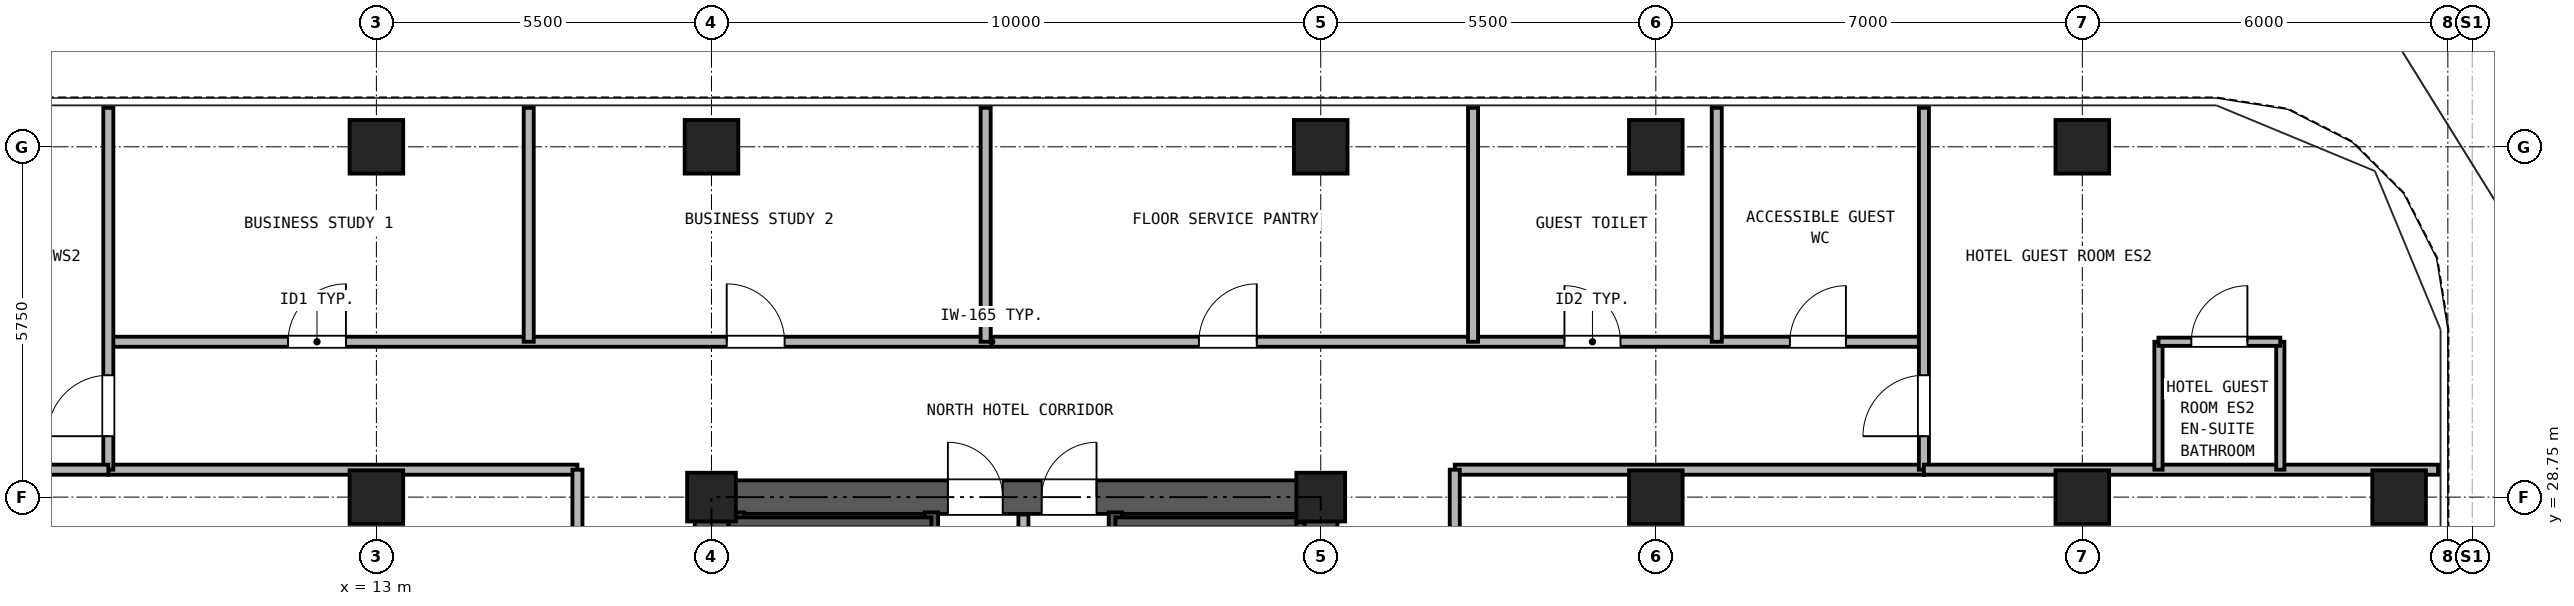
"""IFC4 building model, lengths in metres.
Left out: names, types, materials, properties, quantities, classifications, styles, units other than length and angle.
Written with IfcOpenShell. Run it as: python <this file> out.ifc"""

import sys

from ifc_helpers import new_model, si_unit, direction, frame, frame_2d, origin, origin_2d, place, context, subcontext, project, spatial, rectangle, hollow_rectangle, extrude, source, transform, mapped, element, fill, save


model = new_model("IFC4")
c1 = context("Model", 3, precision=1e-05, world=origin(), true_north=direction((0.0, 1.0)))
c2 = subcontext(c1, "Body", "Model", "MODEL_VIEW")
j1 = project(units=[si_unit("LENGTHUNIT", "METRE"), si_unit("PLANEANGLEUNIT", "RADIAN")], contexts=[c1])
p1 = place(None, origin())
s1 = spatial("IfcSite", under=j1, at=p1, CompositionType="ELEMENT")
p2 = place(p1, origin())
s2 = spatial("IfcBuilding", under=s1, at=p2, CompositionType="ELEMENT")
p3 = place(p2, frame((0.0, 0.0, 111.9)))
s3 = spatial("IfcBuildingStorey", under=s2, at=p3, CompositionType="ELEMENT", Elevation=111.9)
m1 = source(origin(), c2, "Body", "SweptSolid", [
    extrude(hollow_rectangle(XDim=0.88, YDim=0.88, WallThickness=0.05, at=origin_2d()), origin(), (0.0, 0.0, 1.0), 2.95),
])
for number, where, z_axis, x_axis in (
    (1, (13.0, 34.5, 0.0), (0.0, 0.0, 1.0), (1.0, 0.0, 0.0)),
    (2, (18.5, 34.5, 0.0), (0.0, 0.0, 1.0), (1.0, 0.0, 0.0)),
    (3, (28.5, 34.5, 0.0), (0.0, 0.0, 1.0), (1.0, 0.0, 0.0)),
    (4, (34.0, 34.5, 0.0), (0.0, 0.0, 1.0), (1.0, 0.0, 0.0)),
    (5, (41.0, 34.5, 0.0), (0.0, 0.0, 1.0), (1.0, 0.0, 0.0)),
    (6, (46.2, 28.75, 0.0), (0.0, 0.0, 1.0), (1.0, 0.0, 0.0)),
    (7, (13.0, 28.75, 0.0), (0.0, 0.0, 1.0), (1.0, 0.0, 0.0)),
):
    element("IfcColumn", number, at=place(p3, frame(where, z_axis=z_axis, x_axis=x_axis)), inside=s3, PredefinedType="COLUMN", context=c2, shape_type="MappedRepresentation", body=[
        mapped(m1, transform((0.0, 0.0, 0.0), x_axis=(1.0, 0.0, 0.0), y_axis=(0.0, 1.0, 0.0), z_axis=(0.0, 0.0, 1.0), scale=1.0)),
    ])
m2 = source(origin(), c2, "Body", "SweptSolid", [
    extrude(hollow_rectangle(XDim=0.8, YDim=0.8, WallThickness=0.045, at=origin_2d()), origin(), (0.0, 0.0, 1.0), 2.95),
])
for number, where, z_axis, x_axis in (
    (8, (18.5, 28.75, 0.0), (0.0, 0.0, 1.0), (1.0, 0.0, 0.0)),
    (9, (28.5, 28.75, 0.0), (0.0, 0.0, 1.0), (1.0, 0.0, 0.0)),
):
    element("IfcColumn", number, at=place(p3, frame(where, z_axis=z_axis, x_axis=x_axis)), inside=s3, PredefinedType="COLUMN", context=c2, shape_type="MappedRepresentation", body=[
        mapped(m2, transform((0.0, 0.0, 0.0), x_axis=(1.0, 0.0, 0.0), y_axis=(0.0, 1.0, 0.0), z_axis=(0.0, 0.0, 1.0), scale=1.0)),
    ])
for number, where, z_axis, x_axis in (
    (10, (34.0, 28.75, 0.0), (0.0, 0.0, 1.0), (1.0, 0.0, 0.0)),
    (11, (41.0, 28.75, 0.0), (0.0, 0.0, 1.0), (1.0, 0.0, 0.0)),
):
    element("IfcColumn", number, at=place(p3, frame(where, z_axis=z_axis, x_axis=x_axis)), inside=s3, PredefinedType="COLUMN", context=c2, shape_type="MappedRepresentation", body=[
        mapped(m1, transform((0.0, 0.0, 0.0), x_axis=(1.0, 0.0, 0.0), y_axis=(0.0, 1.0, 0.0), z_axis=(0.0, 0.0, 1.0), scale=1.0)),
    ])
p4 = place(p3, frame((18.225, 28.75, 0.0), z_axis=(0.0, 0.0, 1.0), x_axis=(1.0, 0.0, 0.0)))
e12 = element("IfcWall", 12, at=p4, inside=s3, PredefinedType="SHEAR", context=c2, shape_type="SweptSolid", body=[
    extrude(rectangle(XDim=10.55, YDim=0.55, at=frame_2d((5.275, 0.0))), origin(), (0.0, 0.0, 1.0), 2.95),
])
p5 = place(p4, frame((4.155, 0.0, 0.0)))
e13 = element("IfcOpeningElement", 13, at=p5, cuts=e12, PredefinedType="OPENING", context=c2, shape_type="SweptSolid", body=[
    extrude(rectangle(XDim=0.9, YDim=2.05, at=frame_2d((0.45, 1.025))), frame((0.0, 0.285, 0.0), z_axis=(0.0, -1.0, 0.0), x_axis=(1.0, 0.0, 0.0)), (0.0, 0.0, 1.0), 0.57),
])
p6 = place(p4, frame((5.695, 0.0, 0.0)))
e14 = element("IfcOpeningElement", 14, at=p6, cuts=e12, PredefinedType="OPENING", context=c2, shape_type="SweptSolid", body=[
    extrude(rectangle(XDim=0.9, YDim=2.05, at=frame_2d((0.45, 1.025))), frame((0.0, 0.285, 0.0), z_axis=(0.0, -1.0, 0.0), x_axis=(1.0, 0.0, 0.0)), (0.0, 0.0, 1.0), 0.57),
])
p7 = place(p3, frame((18.5, 11.775, 0.0), z_axis=(0.0, 0.0, 1.0), x_axis=(0.0, 1.0, 0.0)))
e15 = element("IfcWall", 15, at=p7, inside=s3, PredefinedType="SHEAR", context=c2, shape_type="SweptSolid", body=[
    extrude(rectangle(XDim=16.7, YDim=0.55, at=frame_2d((8.35, 0.0))), origin(), (0.0, 0.0, 1.0), 2.95),
])
p8 = place(p7, frame((7.375, 0.0, 0.0)))
e16 = element("IfcOpeningElement", 16, at=p8, cuts=e15, PredefinedType="OPENING", context=c2, shape_type="SweptSolid", body=[
    extrude(rectangle(XDim=1.15, YDim=2.2, at=frame_2d((0.575, 1.1))), frame((0.0, 0.285, 0.0), z_axis=(0.0, -1.0, 0.0), x_axis=(1.0, 0.0, 0.0)), (0.0, 0.0, 1.0), 0.57),
])
p9 = place(p3, frame((28.5, 11.775, 0.0), z_axis=(0.0, 0.0, 1.0), x_axis=(0.0, 1.0, 0.0)))
e17 = element("IfcWall", 17, at=p9, inside=s3, PredefinedType="SHEAR", context=c2, shape_type="SweptSolid", body=[
    extrude(rectangle(XDim=16.7, YDim=0.55, at=frame_2d((8.35, 0.0))), origin(), (0.0, 0.0, 1.0), 2.95),
])
p10 = place(p9, frame((7.375, 0.0, 0.0)))
e18 = element("IfcOpeningElement", 18, at=p10, cuts=e17, PredefinedType="OPENING", context=c2, shape_type="SweptSolid", body=[
    extrude(rectangle(XDim=1.15, YDim=2.2, at=frame_2d((0.575, 1.1))), frame((0.0, 0.285, 0.0), z_axis=(0.0, -1.0, 0.0), x_axis=(1.0, 0.0, 0.0)), (0.0, 0.0, 1.0), 0.57),
])
for number, where, z_axis, x_axis in (
    (19, (18.93, 21.39, 0.0), (0.0, 0.0, 1.0), (0.0, 1.0, 0.0)),
    (20, (22.11, 21.39, 0.0), (0.0, 0.0, 1.0), (0.0, 1.0, 0.0)),
    (21, (25.13, 21.39, 0.0), (0.0, 0.0, 1.0), (0.0, 1.0, 0.0)),
):
    element("IfcWall", number, at=place(p3, frame(where, z_axis=z_axis, x_axis=x_axis)), inside=s3, PredefinedType="SOLIDWALL", context=c2, shape_type="SweptSolid", body=[
        extrude(rectangle(XDim=7.11, YDim=0.22, at=frame_2d((3.555, 0.0))), origin(), (0.0, 0.0, 1.0), 2.95),
    ])
p11 = place(p3, frame((18.785, 28.335, 0.0), z_axis=(0.0, 0.0, 1.0), x_axis=(1.0, 0.0, 0.0)))
e22 = element("IfcWall", 22, at=p11, inside=s3, PredefinedType="PARTITIONING", context=c2, shape_type="SweptSolid", body=[
    extrude(rectangle(XDim=3.325, YDim=0.165, at=frame_2d((1.663, 0.0))), origin(), (0.0, 0.0, 1.0), 2.95),
])
p12 = place(p3, frame((25.13, 28.335, 0.0), z_axis=(0.0, 0.0, 1.0), x_axis=(1.0, 0.0, 0.0)))
e23 = element("IfcWall", 23, at=p12, inside=s3, PredefinedType="PARTITIONING", context=c2, shape_type="SweptSolid", body=[
    extrude(rectangle(XDim=3.085, YDim=0.165, at=frame_2d((1.542, 0.0))), origin(), (0.0, 0.0, 1.0), 2.95),
])
p13 = place(p3, frame((28.167, 21.39, 0.0), z_axis=(0.0, 0.0, 1.0), x_axis=(0.0, 1.0, 0.0)))
e24 = element("IfcWall", 24, at=p13, inside=s3, PredefinedType="PARTITIONING", context=c2, shape_type="SweptSolid", body=[
    extrude(rectangle(XDim=6.945, YDim=0.135, at=frame_2d((3.473, 0.0))), origin(), (0.0, 0.0, 1.0), 2.95),
])
p14 = place(p3, frame((23.62, 24.4, 0.0), z_axis=(0.0, 0.0, 1.0), x_axis=(0.0, 1.0, 0.0)))
e25 = element("IfcWall", 25, at=p14, inside=s3, PredefinedType="PARTITIONING", context=c2, shape_type="SweptSolid", body=[
    extrude(rectangle(XDim=4.065, YDim=0.165, at=frame_2d((2.033, 0.0))), origin(), (0.0, 0.0, 1.0), 2.95),
])
p15 = place(p3, frame((8.6, 31.3, 0.0), z_axis=(0.0, 0.0, 1.0), x_axis=(1.0, 0.0, 0.0)))
e26 = element("IfcWall", 26, at=p15, inside=s3, PredefinedType="PARTITIONING", context=c2, shape_type="SweptSolid", body=[
    extrude(rectangle(XDim=29.8, YDim=0.165, at=frame_2d((14.9, 0.0))), origin(), (0.0, 0.0, 1.0), 2.95),
])
p16 = place(p15, frame((2.95, 0.0, 0.0)))
e27 = element("IfcOpeningElement", 27, at=p16, cuts=e26, PredefinedType="OPENING", context=c2, shape_type="SweptSolid", body=[
    extrude(rectangle(XDim=0.95, YDim=2.15, at=frame_2d((0.475, 1.075))), frame((0.0, 0.093, 0.0), z_axis=(0.0, -1.0, 0.0), x_axis=(1.0, 0.0, 0.0)), (0.0, 0.0, 1.0), 0.185),
])
p17 = place(p15, frame((10.15, 0.0, 0.0)))
e28 = element("IfcOpeningElement", 28, at=p17, cuts=e26, PredefinedType="OPENING", context=c2, shape_type="SweptSolid", body=[
    extrude(rectangle(XDim=0.95, YDim=2.15, at=frame_2d((0.475, 1.075))), frame((0.0, 0.093, 0.0), z_axis=(0.0, -1.0, 0.0), x_axis=(1.0, 0.0, 0.0)), (0.0, 0.0, 1.0), 0.185),
])
p18 = place(p15, frame((17.9, 0.0, 0.0)))
e29 = element("IfcOpeningElement", 29, at=p18, cuts=e26, PredefinedType="OPENING", context=c2, shape_type="SweptSolid", body=[
    extrude(rectangle(XDim=0.95, YDim=2.15, at=frame_2d((0.475, 1.075))), frame((0.0, 0.093, 0.0), z_axis=(0.0, -1.0, 0.0), x_axis=(1.0, 0.0, 0.0)), (0.0, 0.0, 1.0), 0.185),
])
p19 = place(p15, frame((23.9, 0.0, 0.0)))
e30 = element("IfcOpeningElement", 30, at=p19, cuts=e26, PredefinedType="OPENING", context=c2, shape_type="SweptSolid", body=[
    extrude(rectangle(XDim=0.92, YDim=2.1, at=frame_2d((0.46, 1.05))), frame((0.0, 0.093, 0.0), z_axis=(0.0, -1.0, 0.0), x_axis=(1.0, 0.0, 0.0)), (0.0, 0.0, 1.0), 0.185),
])
p20 = place(p15, frame((27.6, 0.0, 0.0)))
e31 = element("IfcOpeningElement", 31, at=p20, cuts=e26, PredefinedType="OPENING", context=c2, shape_type="SweptSolid", body=[
    extrude(rectangle(XDim=0.92, YDim=2.1, at=frame_2d((0.46, 1.05))), frame((0.0, 0.093, 0.0), z_axis=(0.0, -1.0, 0.0), x_axis=(1.0, 0.0, 0.0)), (0.0, 0.0, 1.0), 0.185),
])
for number, where, z_axis, x_axis in (
    (32, (8.6, 29.2, 0.0), (0.0, 0.0, 1.0), (1.0, 0.0, 0.0)),
    (33, (30.7, 29.2, 0.0), (0.0, 0.0, 1.0), (1.0, 0.0, 0.0)),
):
    element("IfcWall", number, at=place(p3, frame(where, z_axis=z_axis, x_axis=x_axis)), inside=s3, PredefinedType="PARTITIONING", context=c2, shape_type="SweptSolid", body=[
        extrude(rectangle(XDim=7.7, YDim=0.165, at=frame_2d((3.85, 0.0))), origin(), (0.0, 0.0, 1.0), 2.95),
    ])
p21 = place(p3, frame((16.3, 11.05, 0.0), z_axis=(0.0, 0.0, 1.0), x_axis=(0.0, 1.0, 0.0)))
e34 = element("IfcWall", 34, at=p21, inside=s3, PredefinedType="PARTITIONING", context=c2, shape_type="SweptSolid", body=[
    extrude(rectangle(XDim=18.15, YDim=0.165, at=frame_2d((9.075, 0.0))), origin(), (0.0, 0.0, 1.0), 2.95),
])
p22 = place(p21, frame((4.037, 0.0, 0.0)))
e35 = element("IfcOpeningElement", 35, at=p22, cuts=e34, PredefinedType="OPENING", context=c2, shape_type="SweptSolid", body=[
    extrude(rectangle(XDim=0.95, YDim=2.15, at=frame_2d((0.475, 1.075))), frame((0.0, 0.093, 0.0), z_axis=(0.0, -1.0, 0.0), x_axis=(1.0, 0.0, 0.0)), (0.0, 0.0, 1.0), 0.185),
])
p23 = place(p21, frame((13.113, 0.0, 0.0)))
e36 = element("IfcOpeningElement", 36, at=p23, cuts=e34, PredefinedType="OPENING", context=c2, shape_type="SweptSolid", body=[
    extrude(rectangle(XDim=0.95, YDim=2.15, at=frame_2d((0.475, 1.075))), frame((0.0, 0.093, 0.0), z_axis=(0.0, -1.0, 0.0), x_axis=(1.0, 0.0, 0.0)), (0.0, 0.0, 1.0), 0.185),
])
p24 = place(p3, frame((30.7, 11.05, 0.0), z_axis=(0.0, 0.0, 1.0), x_axis=(0.0, 1.0, 0.0)))
e37 = element("IfcWall", 37, at=p24, inside=s3, PredefinedType="PARTITIONING", context=c2, shape_type="SweptSolid", body=[
    extrude(rectangle(XDim=18.15, YDim=0.165, at=frame_2d((9.075, 0.0))), origin(), (0.0, 0.0, 1.0), 2.95),
])
p25 = place(p24, frame((8.575, 0.0, 0.0)))
e38 = element("IfcOpeningElement", 38, at=p25, cuts=e37, PredefinedType="OPENING", context=c2, shape_type="SweptSolid", body=[
    extrude(rectangle(XDim=0.95, YDim=2.15, at=frame_2d((0.475, 1.075))), frame((0.0, 0.093, 0.0), z_axis=(0.0, -1.0, 0.0), x_axis=(1.0, 0.0, 0.0)), (0.0, 0.0, 1.0), 0.185),
])
p26 = place(p3, frame((8.6, 29.2, 0.0), z_axis=(0.0, 0.0, 1.0), x_axis=(0.0, 1.0, 0.0)))
e39 = element("IfcWall", 39, at=p26, inside=s3, PredefinedType="PARTITIONING", context=c2, shape_type="SweptSolid", body=[
    extrude(rectangle(XDim=5.94, YDim=0.165, at=frame_2d((2.97, 0.0))), origin(), (0.0, 0.0, 1.0), 2.95),
])
p27 = place(p26, frame((0.55, 0.0, 0.0)))
e40 = element("IfcOpeningElement", 40, at=p27, cuts=e39, PredefinedType="OPENING", context=c2, shape_type="SweptSolid", body=[
    extrude(rectangle(XDim=1.0, YDim=2.15, at=frame_2d((0.5, 1.075))), frame((0.0, 0.093, 0.0), z_axis=(0.0, -1.0, 0.0), x_axis=(1.0, 0.0, 0.0)), (0.0, 0.0, 1.0), 0.185),
])
p28 = place(p3, frame((38.4, 29.2, 0.0), z_axis=(0.0, 0.0, 1.0), x_axis=(0.0, 1.0, 0.0)))
e41 = element("IfcWall", 41, at=p28, inside=s3, PredefinedType="PARTITIONING", context=c2, shape_type="SweptSolid", body=[
    extrude(rectangle(XDim=5.94, YDim=0.165, at=frame_2d((2.97, 0.0))), origin(), (0.0, 0.0, 1.0), 2.95),
])
p29 = place(p28, frame((0.55, 0.0, 0.0)))
e42 = element("IfcOpeningElement", 42, at=p29, cuts=e41, PredefinedType="OPENING", context=c2, shape_type="SweptSolid", body=[
    extrude(rectangle(XDim=1.0, YDim=2.15, at=frame_2d((0.5, 1.075))), frame((0.0, 0.093, 0.0), z_axis=(0.0, -1.0, 0.0), x_axis=(1.0, 0.0, 0.0)), (0.0, 0.0, 1.0), 0.185),
])
for number, where, z_axis, x_axis in (
    (43, (0.16, 29.2, 0.0), (0.0, 0.0, 1.0), (1.0, 0.0, 0.0)),
    (44, (38.4, 29.2, 0.0), (0.0, 0.0, 1.0), (1.0, 0.0, 0.0)),
):
    element("IfcWall", number, at=place(p3, frame(where, z_axis=z_axis, x_axis=x_axis)), inside=s3, PredefinedType="PARTITIONING", context=c2, shape_type="SweptSolid", body=[
        extrude(rectangle(XDim=8.44, YDim=0.165, at=frame_2d((4.22, 0.0))), origin(), (0.0, 0.0, 1.0), 2.95),
    ])
for number, where, z_axis, x_axis in (
    (45, (42.25, 29.2, 0.0), (0.0, 0.0, 1.0), (0.0, 1.0, 0.0)),
    (46, (44.25, 29.2, 0.0), (0.0, 0.0, 1.0), (0.0, 1.0, 0.0)),
):
    element("IfcWall", number, at=place(p3, frame(where, z_axis=z_axis, x_axis=x_axis)), inside=s3, PredefinedType="PARTITIONING", context=c2, shape_type="SweptSolid", body=[
        extrude(rectangle(XDim=2.1, YDim=0.135, at=frame_2d((1.05, 0.0))), origin(), (0.0, 0.0, 1.0), 2.95),
    ])
p30 = place(p3, frame((42.25, 31.3, 0.0), z_axis=(0.0, 0.0, 1.0), x_axis=(1.0, 0.0, 0.0)))
e47 = element("IfcWall", 47, at=p30, inside=s3, PredefinedType="PARTITIONING", context=c2, shape_type="SweptSolid", body=[
    extrude(rectangle(XDim=2.0, YDim=0.135, at=frame_2d((1.0, 0.0))), origin(), (0.0, 0.0, 1.0), 2.95),
])
p31 = place(p30, frame((0.54, 0.0, 0.0)))
e48 = element("IfcOpeningElement", 48, at=p31, cuts=e47, PredefinedType="OPENING", context=c2, shape_type="SweptSolid", body=[
    extrude(rectangle(XDim=0.92, YDim=2.1, at=frame_2d((0.46, 1.05))), frame((0.0, 0.077, 0.0), z_axis=(0.0, -1.0, 0.0), x_axis=(1.0, 0.0, 0.0)), (0.0, 0.0, 1.0), 0.155),
])
for number, where, z_axis, x_axis in (
    (49, (15.5, 31.3, 0.0), (0.0, 0.0, 1.0), (0.0, 1.0, 0.0)),
    (50, (23.0, 31.3, 0.0), (0.0, 0.0, 1.0), (0.0, 1.0, 0.0)),
    (51, (31.0, 31.3, 0.0), (0.0, 0.0, 1.0), (0.0, 1.0, 0.0)),
    (52, (35.0, 31.3, 0.0), (0.0, 0.0, 1.0), (0.0, 1.0, 0.0)),
):
    element("IfcWall", number, at=place(p3, frame(where, z_axis=z_axis, x_axis=x_axis)), inside=s3, PredefinedType="PARTITIONING", context=c2, shape_type="SweptSolid", body=[
        extrude(rectangle(XDim=3.84, YDim=0.165, at=frame_2d((1.92, 0.0))), origin(), (0.0, 0.0, 1.0), 2.95),
    ])
p32 = place(p5, origin())
e53 = element("IfcDoor", 53, at=p32, inside=s3, OperationType="SINGLE_SWING_LEFT", PredefinedType="DOOR", context=c2, shape_type="SweptSolid", body=[
    extrude(rectangle(XDim=0.9, YDim=2.05, at=frame_2d((0.45, 1.025))), frame((0.0, 0.025, 0.0), z_axis=(0.0, -1.0, 0.0), x_axis=(1.0, 0.0, 0.0)), (0.0, 0.0, 1.0), 0.05),
])
fill(e13, e53)
p33 = place(p6, origin())
e54 = element("IfcDoor", 54, at=p33, inside=s3, OperationType="SINGLE_SWING_RIGHT", PredefinedType="DOOR", context=c2, shape_type="SweptSolid", body=[
    extrude(rectangle(XDim=0.9, YDim=2.05, at=frame_2d((0.45, 1.025))), frame((0.0, 0.025, 0.0), z_axis=(0.0, -1.0, 0.0), x_axis=(1.0, 0.0, 0.0)), (0.0, 0.0, 1.0), 0.05),
])
fill(e14, e54)
p34 = place(p27, origin())
e55 = element("IfcDoor", 55, at=p34, inside=s3, OperationType="SINGLE_SWING_LEFT", PredefinedType="DOOR", context=c2, shape_type="SweptSolid", body=[
    extrude(rectangle(XDim=1.0, YDim=2.15, at=frame_2d((0.5, 1.075))), frame((0.0, 0.025, 0.0), z_axis=(0.0, -1.0, 0.0), x_axis=(1.0, 0.0, 0.0)), (0.0, 0.0, 1.0), 0.05),
])
fill(e40, e55)
p35 = place(p31, frame((0.92, 0.0, 0.0), z_axis=(0.0, 0.0, 1.0), x_axis=(-1.0, 0.0, 0.0)))
e56 = element("IfcDoor", 56, at=p35, inside=s3, OperationType="SINGLE_SWING_RIGHT", PredefinedType="DOOR", context=c2, shape_type="SweptSolid", body=[
    extrude(rectangle(XDim=0.92, YDim=2.1, at=frame_2d((0.46, 1.05))), frame((0.0, 0.025, 0.0), z_axis=(0.0, -1.0, 0.0), x_axis=(1.0, 0.0, 0.0)), (0.0, 0.0, 1.0), 0.05),
])
fill(e48, e56)
p36 = place(p29, frame((1.0, 0.0, 0.0), z_axis=(0.0, 0.0, 1.0), x_axis=(-1.0, 0.0, 0.0)))
e57 = element("IfcDoor", 57, at=p36, inside=s3, OperationType="SINGLE_SWING_LEFT", PredefinedType="DOOR", context=c2, shape_type="SweptSolid", body=[
    extrude(rectangle(XDim=1.0, YDim=2.15, at=frame_2d((0.5, 1.075))), frame((0.0, 0.025, 0.0), z_axis=(0.0, -1.0, 0.0), x_axis=(1.0, 0.0, 0.0)), (0.0, 0.0, 1.0), 0.05),
])
fill(e42, e57)
p37 = place(p16, origin())
e58 = element("IfcDoor", 58, at=p37, inside=s3, OperationType="SINGLE_SWING_RIGHT", PredefinedType="DOOR", context=c2, shape_type="SweptSolid", body=[
    extrude(rectangle(XDim=0.95, YDim=2.15, at=frame_2d((0.475, 1.075))), frame((0.0, 0.025, 0.0), z_axis=(0.0, -1.0, 0.0), x_axis=(1.0, 0.0, 0.0)), (0.0, 0.0, 1.0), 0.05),
])
fill(e27, e58)
p38 = place(p17, origin())
e59 = element("IfcDoor", 59, at=p38, inside=s3, OperationType="SINGLE_SWING_LEFT", PredefinedType="DOOR", context=c2, shape_type="SweptSolid", body=[
    extrude(rectangle(XDim=0.95, YDim=2.15, at=frame_2d((0.475, 1.075))), frame((0.0, 0.025, 0.0), z_axis=(0.0, -1.0, 0.0), x_axis=(1.0, 0.0, 0.0)), (0.0, 0.0, 1.0), 0.05),
])
fill(e28, e59)
p39 = place(p18, origin())
e60 = element("IfcDoor", 60, at=p39, inside=s3, OperationType="SINGLE_SWING_RIGHT", PredefinedType="DOOR", context=c2, shape_type="SweptSolid", body=[
    extrude(rectangle(XDim=0.95, YDim=2.15, at=frame_2d((0.475, 1.075))), frame((0.0, 0.025, 0.0), z_axis=(0.0, -1.0, 0.0), x_axis=(1.0, 0.0, 0.0)), (0.0, 0.0, 1.0), 0.05),
])
fill(e29, e60)
p40 = place(p19, origin())
e61 = element("IfcDoor", 61, at=p40, inside=s3, OperationType="SINGLE_SWING_LEFT", PredefinedType="DOOR", context=c2, shape_type="SweptSolid", body=[
    extrude(rectangle(XDim=0.92, YDim=2.1, at=frame_2d((0.46, 1.05))), frame((0.0, 0.025, 0.0), z_axis=(0.0, -1.0, 0.0), x_axis=(1.0, 0.0, 0.0)), (0.0, 0.0, 1.0), 0.05),
])
fill(e30, e61)
p41 = place(p20, origin())
e62 = element("IfcDoor", 62, at=p41, inside=s3, OperationType="SINGLE_SWING_RIGHT", PredefinedType="DOOR", context=c2, shape_type="SweptSolid", body=[
    extrude(rectangle(XDim=0.92, YDim=2.1, at=frame_2d((0.46, 1.05))), frame((0.0, 0.025, 0.0), z_axis=(0.0, -1.0, 0.0), x_axis=(1.0, 0.0, 0.0)), (0.0, 0.0, 1.0), 0.05),
])
fill(e31, e62)
save(model, sys.argv[1])
